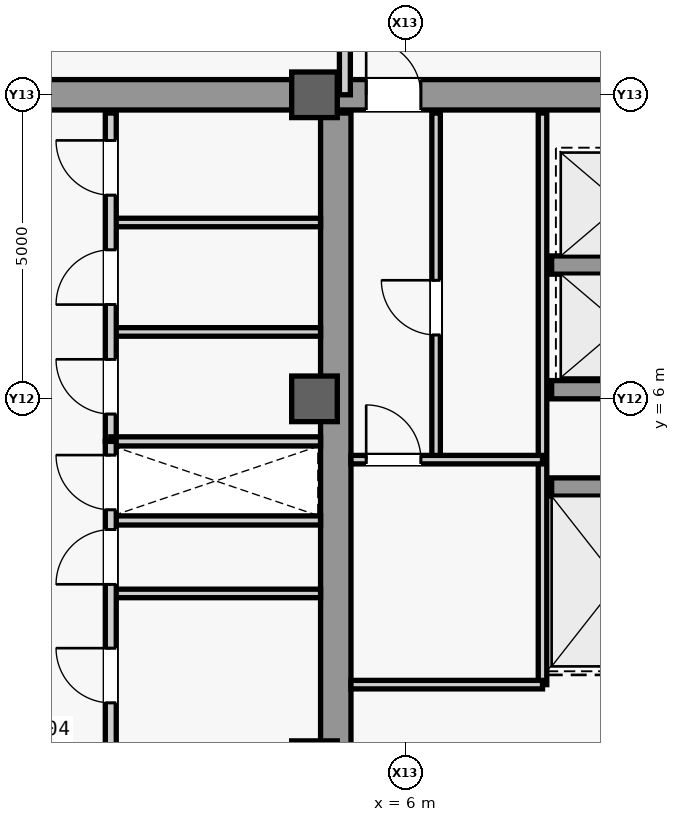
"""IFC4 building model, lengths in metres.
Left out: names, types, materials, properties, quantities, classifications, styles, units other than length and angle.
Written with IfcOpenShell. Run it as: python <this file> out.ifc"""

import sys

from ifc_helpers import new_model, si_unit, direction, frame, frame_2d, origin, origin_2d, place, context, subcontext, project, spatial, rectangle, extrude, source, transform, mapped, element, fill, save


model = new_model("IFC4")
c1 = context("Model", 3, precision=1e-05, world=origin(), true_north=direction((0.0, 1.0)))
c2 = subcontext(c1, "Body", "Model", "MODEL_VIEW")
j1 = project(units=[si_unit("LENGTHUNIT", "METRE"), si_unit("PLANEANGLEUNIT", "RADIAN")], contexts=[c1])
p1 = place(None, origin())
s1 = spatial("IfcSite", under=j1, at=p1, CompositionType="ELEMENT")
p2 = place(p1, origin())
s2 = spatial("IfcBuilding", under=s1, at=p2, CompositionType="ELEMENT")
p3 = place(p2, frame((0.0, 0.0, 326.3)))
s3 = spatial("IfcBuildingStorey", under=s2, at=p3, CompositionType="ELEMENT", Elevation=326.3)
m1 = source(origin(), c2, "Body", "SweptSolid", [
    extrude(rectangle(XDim=21.4, YDim=0.5, at=frame_2d((10.7, 0.0))), origin(), (0.0, 0.0, 1.0), 3.74),
])
p4 = place(p3, frame((4.85, -10.7, 0.0), z_axis=(0.0, 0.0, 1.0), x_axis=(0.0, 1.0, 0.0)))
e1 = element("IfcWall", 1, at=p4, inside=s3, PredefinedType="SHEAR", context=c2, shape_type="MappedRepresentation", body=[
    mapped(m1, transform((0.0, 0.0, 0.0), scale=1.0)),
])
m2 = source(origin(), c2, "Body", "SweptSolid", [
    extrude(rectangle(XDim=5.9, YDim=0.5, at=frame_2d((2.95, 0.0))), origin(), (0.0, 0.0, 1.0), 3.74),
])
p5 = place(p3, frame((4.85, 11.0, 0.0), z_axis=(0.0, 0.0, 1.0), x_axis=(1.0, 0.0, 0.0)))
e2 = element("IfcWall", 2, at=p5, inside=s3, PredefinedType="SHEAR", context=c2, shape_type="MappedRepresentation", body=[
    mapped(m2, transform((0.0, 0.0, 0.0), scale=1.0)),
])
m3 = source(origin(), c2, "Body", "SweptSolid", [
    extrude(rectangle(XDim=0.9, YDim=2.15, at=frame_2d((0.45, 1.075))), frame((0.0, 0.26, 0.0), z_axis=(0.0, -1.0, 0.0), x_axis=(1.0, 0.0, 0.0)), (0.0, 0.0, 1.0), 0.52),
])
p6 = place(p5, frame((0.5, 0.0, 0.0)))
e3 = element("IfcOpeningElement", 3, at=p6, cuts=e2, PredefinedType="OPENING", context=c2, shape_type="MappedRepresentation", body=[
    mapped(m3, transform((0.0, 0.0, 0.0), scale=1.0)),
])
m4 = source(origin(), c2, "Body", "SweptSolid", [
    extrude(rectangle(XDim=9.2, YDim=0.5, at=frame_2d((4.6, 0.0))), origin(), (0.0, 0.0, 1.0), 3.74),
])
p7 = place(p3, frame((-4.6, 11.0, 0.0), z_axis=(0.0, 0.0, 1.0), x_axis=(1.0, 0.0, 0.0)))
e4 = element("IfcWall", 4, at=p7, inside=s3, PredefinedType="SHEAR", context=c2, shape_type="MappedRepresentation", body=[
    mapped(m4, transform((0.0, 0.0, 0.0), scale=1.0)),
])
m5 = source(origin(), c2, "Body", "SweptSolid", [
    extrude(rectangle(XDim=0.75, YDim=0.75, at=origin_2d()), origin(), (0.0, 0.0, 1.0), 4.0),
])
for number, where, z_axis, x_axis in (
    (5, (4.5, 0.0, 0.0), (0.0, 0.0, 1.0), (1.0, 0.0, 0.0)),
    (6, (4.5, 6.0, 0.0), (0.0, 0.0, 1.0), (1.0, 0.0, 0.0)),
    (7, (4.5, 11.0, 0.0), (0.0, 0.0, 1.0), (1.0, 0.0, 0.0)),
):
    element("IfcColumn", number, at=place(p3, frame(where, z_axis=z_axis, x_axis=x_axis)), inside=s3, PredefinedType="COLUMN", context=c2, shape_type="MappedRepresentation", body=[
        mapped(m5, transform((0.0, 0.0, 0.0), scale=1.0)),
    ])
m6 = source(origin(), c2, "Body", "SweptSolid", [
    extrude(rectangle(XDim=2.3, YDim=0.3, at=frame_2d((1.15, 0.0))), origin(), (0.0, 0.0, 1.0), 3.74),
])
for number, where, z_axis, x_axis in (
    (8, (8.4, 4.55, 0.0), (0.0, 0.0, 1.0), (1.0, 0.0, 0.0)),
    (9, (8.4, 6.15, 0.0), (0.0, 0.0, 1.0), (1.0, 0.0, 0.0)),
    (10, (8.4, 8.2, 0.0), (0.0, 0.0, 1.0), (1.0, 0.0, 0.0)),
):
    element("IfcWall", number, at=place(p3, frame(where, z_axis=z_axis, x_axis=x_axis)), inside=s3, PredefinedType="SHEAR", context=c2, shape_type="MappedRepresentation", body=[
        mapped(m6, transform((0.0, 0.0, 0.0), scale=1.0)),
    ])
m7 = source(origin(), c2, "Body", "SweptSolid", [
    extrude(rectangle(XDim=9.4, YDim=0.14, at=frame_2d((4.7, 0.0))), origin(), (0.0, 0.0, 1.0), 3.74),
])
p8 = place(p3, frame((8.25, 1.3, 0.0), z_axis=(0.0, 0.0, 1.0), x_axis=(0.0, 1.0, 0.0)))
e11 = element("IfcWall", 11, at=p8, inside=s3, PredefinedType="PARTITIONING", context=c2, shape_type="MappedRepresentation", body=[
    mapped(m7, transform((0.0, 0.0, 0.0), scale=1.0)),
])
m8 = source(origin(), c2, "Body", "SweptSolid", [
    extrude(rectangle(XDim=3.15, YDim=0.14, at=frame_2d((1.575, 0.0))), origin(), (0.0, 0.0, 1.0), 3.74),
])
p9 = place(p3, frame((5.1, 1.3, 0.0), z_axis=(0.0, 0.0, 1.0), x_axis=(1.0, 0.0, 0.0)))
e12 = element("IfcWall", 12, at=p9, inside=s3, PredefinedType="PARTITIONING", context=c2, shape_type="MappedRepresentation", body=[
    mapped(m8, transform((0.0, 0.0, 0.0), scale=1.0)),
])
m9 = source(origin(), c2, "Body", "SweptSolid", [
    extrude(rectangle(XDim=5.7, YDim=0.14, at=frame_2d((2.85, 0.0))), origin(), (0.0, 0.0, 1.0), 3.74),
])
p10 = place(p3, frame((6.5, 5.0, 0.0), z_axis=(0.0, 0.0, 1.0), x_axis=(0.0, 1.0, 0.0)))
e13 = element("IfcWall", 13, at=p10, inside=s3, PredefinedType="PARTITIONING", context=c2, shape_type="MappedRepresentation", body=[
    mapped(m9, transform((0.0, 0.0, 0.0), scale=1.0)),
])
m10 = source(origin(), c2, "Body", "SweptSolid", [
    extrude(rectangle(XDim=0.9, YDim=2.15, at=frame_2d((0.45, 1.075))), frame((0.0, 0.08, 0.0), z_axis=(0.0, -1.0, 0.0), x_axis=(1.0, 0.0, 0.0)), (0.0, 0.0, 1.0), 0.16),
])
p11 = place(p10, frame((2.05, 0.0, 0.0)))
e14 = element("IfcOpeningElement", 14, at=p11, cuts=e13, PredefinedType="OPENING", context=c2, shape_type="MappedRepresentation", body=[
    mapped(m10, transform((0.0, 0.0, 0.0), scale=1.0)),
])
p12 = place(p3, frame((5.1, 5.0, 0.0), z_axis=(0.0, 0.0, 1.0), x_axis=(1.0, 0.0, 0.0)))
e15 = element("IfcWall", 15, at=p12, inside=s3, PredefinedType="PARTITIONING", context=c2, shape_type="MappedRepresentation", body=[
    mapped(m8, transform((0.0, 0.0, 0.0), scale=1.0)),
])
p13 = place(p12, frame((0.25, 0.0, 0.0)))
e16 = element("IfcOpeningElement", 16, at=p13, cuts=e15, PredefinedType="OPENING", context=c2, shape_type="MappedRepresentation", body=[
    mapped(m10, transform((0.0, 0.0, 0.0), scale=1.0)),
])
m11 = source(origin(), c2, "Body", "SweptSolid", [
    extrude(rectangle(XDim=3.45, YDim=0.15, at=frame_2d((1.725, 0.0))), origin(), (0.0, 0.0, 1.0), 3.74),
])
p14 = place(p3, frame((1.15, 4.0, 0.0), z_axis=(0.0, 0.0, 1.0), x_axis=(1.0, 0.0, 0.0)))
e17 = element("IfcWall", 17, at=p14, inside=s3, PredefinedType="PARTITIONING", context=c2, shape_type="MappedRepresentation", body=[
    mapped(m11, transform((0.0, 0.0, 0.0), scale=1.0)),
])
m12 = source(origin(), c2, "Body", "SweptSolid", [
    extrude(rectangle(XDim=3.45, YDim=0.14, at=frame_2d((1.725, 0.0))), origin(), (0.0, 0.0, 1.0), 3.74),
])
for number, where, z_axis, x_axis in (
    (18, (1.15, 7.1, 0.0), (0.0, 0.0, 1.0), (1.0, 0.0, 0.0)),
    (19, (1.15, 8.9, 0.0), (0.0, 0.0, 1.0), (1.0, 0.0, 0.0)),
):
    element("IfcWall", number, at=place(p3, frame(where, z_axis=z_axis, x_axis=x_axis)), inside=s3, PredefinedType="PARTITIONING", context=c2, shape_type="MappedRepresentation", body=[
        mapped(m12, transform((0.0, 0.0, 0.0), scale=1.0)),
    ])
m13 = source(origin(), c2, "Body", "SweptSolid", [
    extrude(rectangle(XDim=5.4, YDim=0.18, at=frame_2d((2.7, 0.0))), origin(), (0.0, 0.0, 1.0), 3.74),
])
p15 = place(p3, frame((1.15, 5.3, 0.0), z_axis=(0.0, 0.0, 1.0), x_axis=(0.0, 1.0, 0.0)))
e20 = element("IfcWall", 20, at=p15, inside=s3, PredefinedType="PARTITIONING", context=c2, shape_type="MappedRepresentation", body=[
    mapped(m13, transform((0.0, 0.0, 0.0), scale=1.0)),
])
m14 = source(origin(), c2, "Body", "SweptSolid", [
    extrude(rectangle(XDim=0.9, YDim=2.15, at=frame_2d((0.45, 1.075))), frame((0.0, 0.1, 0.0), z_axis=(0.0, -1.0, 0.0), x_axis=(1.0, 0.0, 0.0)), (0.0, 0.0, 1.0), 0.2),
])
p16 = place(p15, frame((0.45, 0.0, 0.0)))
e21 = element("IfcOpeningElement", 21, at=p16, cuts=e20, PredefinedType="OPENING", context=c2, shape_type="MappedRepresentation", body=[
    mapped(m14, transform((0.0, 0.0, 0.0), scale=1.0)),
])
p17 = place(p15, frame((2.25, 0.0, 0.0)))
e22 = element("IfcOpeningElement", 22, at=p17, cuts=e20, PredefinedType="OPENING", context=c2, shape_type="MappedRepresentation", body=[
    mapped(m14, transform((0.0, 0.0, 0.0), scale=1.0)),
])
p18 = place(p15, frame((4.05, 0.0, 0.0)))
e23 = element("IfcOpeningElement", 23, at=p18, cuts=e20, PredefinedType="OPENING", context=c2, shape_type="MappedRepresentation", body=[
    mapped(m14, transform((0.0, 0.0, 0.0), scale=1.0)),
])
p19 = place(p3, frame((1.15, 5.3, 0.0), z_axis=(0.0, 0.0, 1.0), x_axis=(1.0, 0.0, 0.0)))
e24 = element("IfcWall", 24, at=p19, inside=s3, PredefinedType="PARTITIONING", context=c2, shape_type="MappedRepresentation", body=[
    mapped(m11, transform((0.0, 0.0, 0.0), scale=1.0)),
])
p20 = place(p3, frame((1.15, 2.8, 0.0), z_axis=(0.0, 0.0, 1.0), x_axis=(1.0, 0.0, 0.0)))
e25 = element("IfcWall", 25, at=p20, inside=s3, PredefinedType="PARTITIONING", context=c2, shape_type="MappedRepresentation", body=[
    mapped(m12, transform((0.0, 0.0, 0.0), scale=1.0)),
])
m15 = source(origin(), c2, "Body", "SweptSolid", [
    extrude(rectangle(XDim=10.6, YDim=0.18, at=frame_2d((5.3, 0.0))), origin(), (0.0, 0.0, 1.0), 3.74),
])
p21 = place(p3, frame((1.15, -5.3, 0.0), z_axis=(0.0, 0.0, 1.0), x_axis=(0.0, 1.0, 0.0)))
e26 = element("IfcWall", 26, at=p21, inside=s3, PredefinedType="PARTITIONING", context=c2, shape_type="MappedRepresentation", body=[
    mapped(m15, transform((0.0, 0.0, 0.0), scale=1.0)),
])
p22 = place(p21, frame((0.85, 0.0, 0.0)))
e27 = element("IfcOpeningElement", 27, at=p22, cuts=e26, PredefinedType="OPENING", context=c2, shape_type="MappedRepresentation", body=[
    mapped(m14, transform((0.0, 0.0, 0.0), scale=1.0)),
])
p23 = place(p21, frame((3.55, 0.0, 0.0)))
e28 = element("IfcOpeningElement", 28, at=p23, cuts=e26, PredefinedType="OPENING", context=c2, shape_type="MappedRepresentation", body=[
    mapped(m14, transform((0.0, 0.0, 0.0), scale=1.0)),
])
p24 = place(p21, frame((6.3, 0.0, 0.0)))
e29 = element("IfcOpeningElement", 29, at=p24, cuts=e26, PredefinedType="OPENING", context=c2, shape_type="MappedRepresentation", body=[
    mapped(m14, transform((0.0, 0.0, 0.0), scale=1.0)),
])
p25 = place(p21, frame((8.25, 0.0, 0.0)))
e30 = element("IfcOpeningElement", 30, at=p25, cuts=e26, PredefinedType="OPENING", context=c2, shape_type="MappedRepresentation", body=[
    mapped(m14, transform((0.0, 0.0, 0.0), scale=1.0)),
])
p26 = place(p21, frame((9.475, 0.0, 0.0)))
e31 = element("IfcOpeningElement", 31, at=p26, cuts=e26, PredefinedType="OPENING", context=c2, shape_type="MappedRepresentation", body=[
    mapped(m14, transform((0.0, 0.0, 0.0), scale=1.0)),
])
m16 = source(origin(), c2, "Body", "SweptSolid", [
    extrude(rectangle(XDim=2.6, YDim=0.18, at=frame_2d((1.3, 0.0))), origin(), (0.0, 0.0, 1.0), 3.74),
])
p27 = place(p3, frame((5.0, 11.0, 0.0), z_axis=(0.0, 0.0, 1.0), x_axis=(0.0, 1.0, 0.0)))
e32 = element("IfcWall", 32, at=p27, inside=s3, PredefinedType="PARTITIONING", context=c2, shape_type="MappedRepresentation", body=[
    mapped(m16, transform((0.0, 0.0, 0.0), scale=1.0)),
])
p28 = place(p27, frame((0.85, 0.0, 0.0)))
e33 = element("IfcOpeningElement", 33, at=p28, cuts=e32, PredefinedType="OPENING", context=c2, shape_type="MappedRepresentation", body=[
    mapped(m14, transform((0.0, 0.0, 0.0), scale=1.0)),
])
m17 = source(origin(), c2, "Body", "SweptSolid", [
    extrude(rectangle(XDim=0.9, YDim=2.15, at=frame_2d((0.45, 1.075))), frame((0.0, 0.025, 0.0), z_axis=(0.0, -1.0, 0.0), x_axis=(1.0, 0.0, 0.0)), (0.0, 0.0, 1.0), 0.05),
])
p29 = place(p6, origin())
e34 = element("IfcDoor", 34, at=p29, inside=s3, OperationType="SINGLE_SWING_LEFT", PredefinedType="DOOR", context=c2, shape_type="MappedRepresentation", body=[
    mapped(m17, transform((0.0, 0.0, 0.0), scale=1.0)),
])
fill(e3, e34)
p30 = place(p11, origin())
e35 = element("IfcDoor", 35, at=p30, inside=s3, OperationType="SINGLE_SWING_RIGHT", PredefinedType="DOOR", context=c2, shape_type="MappedRepresentation", body=[
    mapped(m17, transform((0.0, 0.0, 0.0), scale=1.0)),
])
fill(e14, e35)
p31 = place(p13, origin())
e36 = element("IfcDoor", 36, at=p31, inside=s3, OperationType="SINGLE_SWING_LEFT", PredefinedType="DOOR", context=c2, shape_type="MappedRepresentation", body=[
    mapped(m17, transform((0.0, 0.0, 0.0), scale=1.0)),
])
fill(e16, e36)
p32 = place(p16, origin())
e37 = element("IfcDoor", 37, at=p32, inside=s3, OperationType="SINGLE_SWING_RIGHT", PredefinedType="DOOR", context=c2, shape_type="MappedRepresentation", body=[
    mapped(m17, transform((0.0, 0.0, 0.0), scale=1.0)),
])
fill(e21, e37)
p33 = place(p17, origin())
e38 = element("IfcDoor", 38, at=p33, inside=s3, OperationType="SINGLE_SWING_LEFT", PredefinedType="DOOR", context=c2, shape_type="MappedRepresentation", body=[
    mapped(m17, transform((0.0, 0.0, 0.0), scale=1.0)),
])
fill(e22, e38)
p34 = place(p18, origin())
e39 = element("IfcDoor", 39, at=p34, inside=s3, OperationType="SINGLE_SWING_RIGHT", PredefinedType="DOOR", context=c2, shape_type="MappedRepresentation", body=[
    mapped(m17, transform((0.0, 0.0, 0.0), scale=1.0)),
])
fill(e23, e39)
p35 = place(p24, origin())
e40 = element("IfcDoor", 40, at=p35, inside=s3, OperationType="SINGLE_SWING_RIGHT", PredefinedType="DOOR", context=c2, shape_type="MappedRepresentation", body=[
    mapped(m17, transform((0.0, 0.0, 0.0), scale=1.0)),
])
fill(e29, e40)
p36 = place(p25, origin())
e41 = element("IfcDoor", 41, at=p36, inside=s3, OperationType="SINGLE_SWING_LEFT", PredefinedType="DOOR", context=c2, shape_type="MappedRepresentation", body=[
    mapped(m17, transform((0.0, 0.0, 0.0), scale=1.0)),
])
fill(e30, e41)
p37 = place(p26, origin())
e42 = element("IfcDoor", 42, at=p37, inside=s3, OperationType="SINGLE_SWING_RIGHT", PredefinedType="DOOR", context=c2, shape_type="MappedRepresentation", body=[
    mapped(m17, transform((0.0, 0.0, 0.0), scale=1.0)),
])
fill(e31, e42)
save(model, sys.argv[1])
